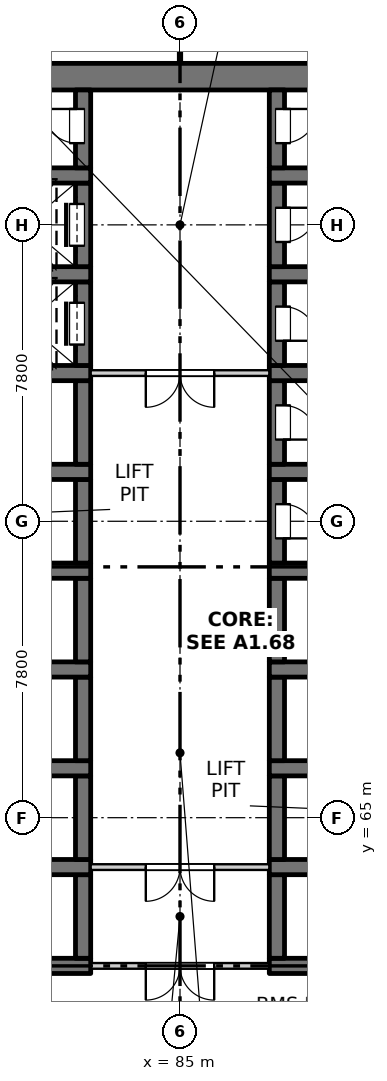
"""IFC4 building model, lengths in metres.
Left out: names, types, materials, properties, quantities, classifications, styles, units other than length and angle.
Written with IfcOpenShell. Run it as: python <this file> out.ifc"""

import sys

from ifc_helpers import new_model, si_unit, direction, frame, frame_2d, origin, place, context, subcontext, project, spatial, rectangle, extrude, element, fill, save


model = new_model("IFC4")
c1 = context("Model", 3, precision=1e-05, world=origin(), true_north=direction((0.0, 1.0)))
c2 = subcontext(c1, "Body", "Model", "MODEL_VIEW")
j1 = project(units=[si_unit("LENGTHUNIT", "METRE"), si_unit("PLANEANGLEUNIT", "RADIAN")], contexts=[c1])
p1 = place(None, origin())
s1 = spatial("IfcSite", under=j1, at=p1, CompositionType="ELEMENT")
p2 = place(p1, origin())
s2 = spatial("IfcBuilding", under=s1, at=p2, CompositionType="ELEMENT")
p3 = place(p2, frame((0.0, 0.0, -4.5)))
s3 = spatial("IfcBuildingStorey", under=s2, at=p3, CompositionType="ELEMENT", Elevation=-4.5)
p4 = place(p3, frame((75.6, 84.5, -0.35), z_axis=(0.0, 0.0, 1.0), x_axis=(1.0, 0.0, 0.0)))
e1 = element("IfcWall", 1, at=p4, inside=s3, PredefinedType="SOLIDWALL", context=c2, shape_type="SweptSolid", body=[
    extrude(rectangle(XDim=18.8, YDim=0.7, at=frame_2d((9.4, 0.0))), origin(), (0.0, 0.0, 1.0), 4.45),
])
p5 = place(p3, frame((79.65, 61.1, -0.35), z_axis=(0.0, 0.0, 1.0), x_axis=(1.0, 0.0, 0.0)))
e2 = element("IfcWall", 2, at=p5, inside=s3, PredefinedType="SOLIDWALL", context=c2, shape_type="SweptSolid", body=[
    extrude(rectangle(XDim=3.0, YDim=0.4, at=frame_2d((1.5, 0.0))), origin(), (0.0, 0.0, 1.0), 4.45),
])
p6 = place(p3, frame((82.45, 61.3, -0.35), z_axis=(0.0, 0.0, 1.0), x_axis=(0.0, 1.0, 0.0)))
e3 = element("IfcWall", 3, at=p6, inside=s3, PredefinedType="SOLIDWALL", context=c2, shape_type="SweptSolid", body=[
    extrude(rectangle(XDim=2.2, YDim=0.4, at=frame_2d((1.1, 0.0))), origin(), (0.0, 0.0, 1.0), 4.45),
])
p7 = place(p3, frame((79.65, 63.7, -0.35), z_axis=(0.0, 0.0, 1.0), x_axis=(1.0, 0.0, 0.0)))
e4 = element("IfcWall", 4, at=p7, inside=s3, PredefinedType="SOLIDWALL", context=c2, shape_type="SweptSolid", body=[
    extrude(rectangle(XDim=3.0, YDim=0.4, at=frame_2d((1.5, 0.0))), origin(), (0.0, 0.0, 1.0), 4.45),
])
p8 = place(p3, frame((82.45, 63.9, -0.35), z_axis=(0.0, 0.0, 1.0), x_axis=(0.0, 1.0, 0.0)))
e5 = element("IfcWall", 5, at=p8, inside=s3, PredefinedType="SOLIDWALL", context=c2, shape_type="SweptSolid", body=[
    extrude(rectangle(XDim=2.2, YDim=0.4, at=frame_2d((1.1, 0.0))), origin(), (0.0, 0.0, 1.0), 4.45),
])
p9 = place(p3, frame((79.65, 66.3, -0.35), z_axis=(0.0, 0.0, 1.0), x_axis=(1.0, 0.0, 0.0)))
e6 = element("IfcWall", 6, at=p9, inside=s3, PredefinedType="SOLIDWALL", context=c2, shape_type="SweptSolid", body=[
    extrude(rectangle(XDim=3.0, YDim=0.4, at=frame_2d((1.5, 0.0))), origin(), (0.0, 0.0, 1.0), 4.45),
])
p10 = place(p3, frame((82.45, 66.5, -0.35), z_axis=(0.0, 0.0, 1.0), x_axis=(0.0, 1.0, 0.0)))
e7 = element("IfcWall", 7, at=p10, inside=s3, PredefinedType="SOLIDWALL", context=c2, shape_type="SweptSolid", body=[
    extrude(rectangle(XDim=2.2, YDim=0.4, at=frame_2d((1.1, 0.0))), origin(), (0.0, 0.0, 1.0), 4.45),
])
p11 = place(p3, frame((79.65, 68.9, -0.35), z_axis=(0.0, 0.0, 1.0), x_axis=(1.0, 0.0, 0.0)))
e8 = element("IfcWall", 8, at=p11, inside=s3, PredefinedType="SOLIDWALL", context=c2, shape_type="SweptSolid", body=[
    extrude(rectangle(XDim=3.0, YDim=0.4, at=frame_2d((1.5, 0.0))), origin(), (0.0, 0.0, 1.0), 4.45),
])
p12 = place(p3, frame((82.45, 69.1, -0.35), z_axis=(0.0, 0.0, 1.0), x_axis=(0.0, 1.0, 0.0)))
e9 = element("IfcWall", 9, at=p12, inside=s3, PredefinedType="SOLIDWALL", context=c2, shape_type="SweptSolid", body=[
    extrude(rectangle(XDim=2.2, YDim=0.4, at=frame_2d((1.1, 0.0))), origin(), (0.0, 0.0, 1.0), 4.45),
])
p13 = place(p3, frame((79.65, 71.5, -0.35), z_axis=(0.0, 0.0, 1.0), x_axis=(1.0, 0.0, 0.0)))
e10 = element("IfcWall", 10, at=p13, inside=s3, PredefinedType="SOLIDWALL", context=c2, shape_type="SweptSolid", body=[
    extrude(rectangle(XDim=3.0, YDim=0.4, at=frame_2d((1.5, 0.0))), origin(), (0.0, 0.0, 1.0), 4.45),
])
p14 = place(p3, frame((82.45, 71.7, -0.35), z_axis=(0.0, 0.0, 1.0), x_axis=(0.0, 1.0, 0.0)))
e11 = element("IfcWall", 11, at=p14, inside=s3, PredefinedType="SOLIDWALL", context=c2, shape_type="SweptSolid", body=[
    extrude(rectangle(XDim=2.2, YDim=0.4, at=frame_2d((1.1, 0.0))), origin(), (0.0, 0.0, 1.0), 4.45),
])
p15 = place(p3, frame((79.65, 74.1, -0.35), z_axis=(0.0, 0.0, 1.0), x_axis=(1.0, 0.0, 0.0)))
e12 = element("IfcWall", 12, at=p15, inside=s3, PredefinedType="SOLIDWALL", context=c2, shape_type="SweptSolid", body=[
    extrude(rectangle(XDim=3.0, YDim=0.4, at=frame_2d((1.5, 0.0))), origin(), (0.0, 0.0, 1.0), 4.45),
])
p16 = place(p3, frame((82.45, 74.3, -0.35), z_axis=(0.0, 0.0, 1.0), x_axis=(0.0, 1.0, 0.0)))
e13 = element("IfcWall", 13, at=p16, inside=s3, PredefinedType="SOLIDWALL", context=c2, shape_type="SweptSolid", body=[
    extrude(rectangle(XDim=2.2, YDim=0.4, at=frame_2d((1.1, 0.0))), origin(), (0.0, 0.0, 1.0), 4.45),
])
p17 = place(p3, frame((79.65, 76.7, -0.35), z_axis=(0.0, 0.0, 1.0), x_axis=(1.0, 0.0, 0.0)))
e14 = element("IfcWall", 14, at=p17, inside=s3, PredefinedType="SOLIDWALL", context=c2, shape_type="SweptSolid", body=[
    extrude(rectangle(XDim=3.0, YDim=0.4, at=frame_2d((1.5, 0.0))), origin(), (0.0, 0.0, 1.0), 4.45),
])
p18 = place(p3, frame((82.45, 76.9, -0.35), z_axis=(0.0, 0.0, 1.0), x_axis=(0.0, 1.0, 0.0)))
e15 = element("IfcWall", 15, at=p18, inside=s3, PredefinedType="SOLIDWALL", context=c2, shape_type="SweptSolid", body=[
    extrude(rectangle(XDim=2.2, YDim=0.4, at=frame_2d((1.1, 0.0))), origin(), (0.0, 0.0, 1.0), 4.45),
])
p19 = place(p18, frame((0.55, 0.0, 0.35)))
e16 = element("IfcOpeningElement", 16, at=p19, cuts=e15, PredefinedType="OPENING", context=c2, shape_type="SweptSolid", body=[
    extrude(rectangle(XDim=1.1, YDim=2.1, at=frame_2d((0.55, 1.05))), frame((0.0, 0.21, 0.0), z_axis=(0.0, -1.0, 0.0), x_axis=(1.0, 0.0, 0.0)), (0.0, 0.0, 1.0), 0.42),
])
p20 = place(p3, frame((79.65, 79.3, -0.35), z_axis=(0.0, 0.0, 1.0), x_axis=(1.0, 0.0, 0.0)))
e17 = element("IfcWall", 17, at=p20, inside=s3, PredefinedType="SOLIDWALL", context=c2, shape_type="SweptSolid", body=[
    extrude(rectangle(XDim=3.0, YDim=0.4, at=frame_2d((1.5, 0.0))), origin(), (0.0, 0.0, 1.0), 4.45),
])
p21 = place(p3, frame((82.45, 79.5, -0.35), z_axis=(0.0, 0.0, 1.0), x_axis=(0.0, 1.0, 0.0)))
e18 = element("IfcWall", 18, at=p21, inside=s3, PredefinedType="SOLIDWALL", context=c2, shape_type="SweptSolid", body=[
    extrude(rectangle(XDim=2.2, YDim=0.4, at=frame_2d((1.1, 0.0))), origin(), (0.0, 0.0, 1.0), 4.45),
])
p22 = place(p21, frame((0.55, 0.0, 0.35)))
e19 = element("IfcOpeningElement", 19, at=p22, cuts=e18, PredefinedType="OPENING", context=c2, shape_type="SweptSolid", body=[
    extrude(rectangle(XDim=1.1, YDim=2.1, at=frame_2d((0.55, 1.05))), frame((0.0, 0.21, 0.0), z_axis=(0.0, -1.0, 0.0), x_axis=(1.0, 0.0, 0.0)), (0.0, 0.0, 1.0), 0.42),
])
p23 = place(p3, frame((79.65, 81.9, -0.35), z_axis=(0.0, 0.0, 1.0), x_axis=(1.0, 0.0, 0.0)))
e20 = element("IfcWall", 20, at=p23, inside=s3, PredefinedType="SOLIDWALL", context=c2, shape_type="SweptSolid", body=[
    extrude(rectangle(XDim=3.0, YDim=0.4, at=frame_2d((1.5, 0.0))), origin(), (0.0, 0.0, 1.0), 4.45),
])
p24 = place(p3, frame((82.45, 82.1, -0.35), z_axis=(0.0, 0.0, 1.0), x_axis=(0.0, 1.0, 0.0)))
e21 = element("IfcWall", 21, at=p24, inside=s3, PredefinedType="SOLIDWALL", context=c2, shape_type="SweptSolid", body=[
    extrude(rectangle(XDim=2.05, YDim=0.4, at=frame_2d((1.025, 0.0))), origin(), (0.0, 0.0, 1.0), 4.45),
])
p25 = place(p24, frame((0.65, 0.0, 0.35)))
e22 = element("IfcOpeningElement", 22, at=p25, cuts=e21, PredefinedType="OPENING", context=c2, shape_type="SweptSolid", body=[
    extrude(rectangle(XDim=0.9, YDim=2.1, at=frame_2d((0.45, 1.05))), frame((0.0, 0.21, 0.0), z_axis=(0.0, -1.0, 0.0), x_axis=(1.0, 0.0, 0.0)), (0.0, 0.0, 1.0), 0.42),
])
p26 = place(p3, frame((87.35, 61.1, -0.35), z_axis=(0.0, 0.0, 1.0), x_axis=(1.0, 0.0, 0.0)))
e23 = element("IfcWall", 23, at=p26, inside=s3, PredefinedType="SOLIDWALL", context=c2, shape_type="SweptSolid", body=[
    extrude(rectangle(XDim=3.0, YDim=0.4, at=frame_2d((1.5, 0.0))), origin(), (0.0, 0.0, 1.0), 4.45),
])
p27 = place(p3, frame((87.55, 61.3, -0.35), z_axis=(0.0, 0.0, 1.0), x_axis=(0.0, 1.0, 0.0)))
e24 = element("IfcWall", 24, at=p27, inside=s3, PredefinedType="SOLIDWALL", context=c2, shape_type="SweptSolid", body=[
    extrude(rectangle(XDim=2.2, YDim=0.4, at=frame_2d((1.1, 0.0))), origin(), (0.0, 0.0, 1.0), 4.45),
])
p28 = place(p3, frame((87.35, 63.7, -0.35), z_axis=(0.0, 0.0, 1.0), x_axis=(1.0, 0.0, 0.0)))
e25 = element("IfcWall", 25, at=p28, inside=s3, PredefinedType="SOLIDWALL", context=c2, shape_type="SweptSolid", body=[
    extrude(rectangle(XDim=3.0, YDim=0.4, at=frame_2d((1.5, 0.0))), origin(), (0.0, 0.0, 1.0), 4.45),
])
p29 = place(p3, frame((87.55, 63.9, -0.35), z_axis=(0.0, 0.0, 1.0), x_axis=(0.0, 1.0, 0.0)))
e26 = element("IfcWall", 26, at=p29, inside=s3, PredefinedType="SOLIDWALL", context=c2, shape_type="SweptSolid", body=[
    extrude(rectangle(XDim=2.2, YDim=0.4, at=frame_2d((1.1, 0.0))), origin(), (0.0, 0.0, 1.0), 4.45),
])
p30 = place(p3, frame((87.35, 66.3, -0.35), z_axis=(0.0, 0.0, 1.0), x_axis=(1.0, 0.0, 0.0)))
e27 = element("IfcWall", 27, at=p30, inside=s3, PredefinedType="SOLIDWALL", context=c2, shape_type="SweptSolid", body=[
    extrude(rectangle(XDim=3.0, YDim=0.4, at=frame_2d((1.5, 0.0))), origin(), (0.0, 0.0, 1.0), 4.45),
])
p31 = place(p3, frame((87.55, 66.5, -0.35), z_axis=(0.0, 0.0, 1.0), x_axis=(0.0, 1.0, 0.0)))
e28 = element("IfcWall", 28, at=p31, inside=s3, PredefinedType="SOLIDWALL", context=c2, shape_type="SweptSolid", body=[
    extrude(rectangle(XDim=2.2, YDim=0.4, at=frame_2d((1.1, 0.0))), origin(), (0.0, 0.0, 1.0), 4.45),
])
p32 = place(p3, frame((87.35, 68.9, -0.35), z_axis=(0.0, 0.0, 1.0), x_axis=(1.0, 0.0, 0.0)))
e29 = element("IfcWall", 29, at=p32, inside=s3, PredefinedType="SOLIDWALL", context=c2, shape_type="SweptSolid", body=[
    extrude(rectangle(XDim=3.0, YDim=0.4, at=frame_2d((1.5, 0.0))), origin(), (0.0, 0.0, 1.0), 4.45),
])
p33 = place(p3, frame((87.55, 69.1, -0.35), z_axis=(0.0, 0.0, 1.0), x_axis=(0.0, 1.0, 0.0)))
e30 = element("IfcWall", 30, at=p33, inside=s3, PredefinedType="SOLIDWALL", context=c2, shape_type="SweptSolid", body=[
    extrude(rectangle(XDim=2.2, YDim=0.4, at=frame_2d((1.1, 0.0))), origin(), (0.0, 0.0, 1.0), 4.45),
])
p34 = place(p3, frame((87.35, 71.5, -0.35), z_axis=(0.0, 0.0, 1.0), x_axis=(1.0, 0.0, 0.0)))
e31 = element("IfcWall", 31, at=p34, inside=s3, PredefinedType="SOLIDWALL", context=c2, shape_type="SweptSolid", body=[
    extrude(rectangle(XDim=3.0, YDim=0.4, at=frame_2d((1.5, 0.0))), origin(), (0.0, 0.0, 1.0), 4.45),
])
p35 = place(p3, frame((87.55, 71.7, -0.35), z_axis=(0.0, 0.0, 1.0), x_axis=(0.0, 1.0, 0.0)))
e32 = element("IfcWall", 32, at=p35, inside=s3, PredefinedType="SOLIDWALL", context=c2, shape_type="SweptSolid", body=[
    extrude(rectangle(XDim=2.2, YDim=0.4, at=frame_2d((1.1, 0.0))), origin(), (0.0, 0.0, 1.0), 4.45),
])
p36 = place(p35, frame((0.65, 0.0, 0.35)))
e33 = element("IfcOpeningElement", 33, at=p36, cuts=e32, PredefinedType="OPENING", context=c2, shape_type="SweptSolid", body=[
    extrude(rectangle(XDim=0.9, YDim=2.1, at=frame_2d((0.45, 1.05))), frame((0.0, 0.21, 0.0), z_axis=(0.0, -1.0, 0.0), x_axis=(1.0, 0.0, 0.0)), (0.0, 0.0, 1.0), 0.42),
])
p37 = place(p3, frame((87.35, 74.1, -0.35), z_axis=(0.0, 0.0, 1.0), x_axis=(1.0, 0.0, 0.0)))
e34 = element("IfcWall", 34, at=p37, inside=s3, PredefinedType="SOLIDWALL", context=c2, shape_type="SweptSolid", body=[
    extrude(rectangle(XDim=3.0, YDim=0.4, at=frame_2d((1.5, 0.0))), origin(), (0.0, 0.0, 1.0), 4.45),
])
p38 = place(p3, frame((87.55, 74.3, -0.35), z_axis=(0.0, 0.0, 1.0), x_axis=(0.0, 1.0, 0.0)))
e35 = element("IfcWall", 35, at=p38, inside=s3, PredefinedType="SOLIDWALL", context=c2, shape_type="SweptSolid", body=[
    extrude(rectangle(XDim=2.2, YDim=0.4, at=frame_2d((1.1, 0.0))), origin(), (0.0, 0.0, 1.0), 4.45),
])
p39 = place(p38, frame((0.65, 0.0, 0.35)))
e36 = element("IfcOpeningElement", 36, at=p39, cuts=e35, PredefinedType="OPENING", context=c2, shape_type="SweptSolid", body=[
    extrude(rectangle(XDim=0.9, YDim=2.1, at=frame_2d((0.45, 1.05))), frame((0.0, 0.21, 0.0), z_axis=(0.0, -1.0, 0.0), x_axis=(1.0, 0.0, 0.0)), (0.0, 0.0, 1.0), 0.42),
])
p40 = place(p3, frame((87.35, 76.7, -0.35), z_axis=(0.0, 0.0, 1.0), x_axis=(1.0, 0.0, 0.0)))
e37 = element("IfcWall", 37, at=p40, inside=s3, PredefinedType="SOLIDWALL", context=c2, shape_type="SweptSolid", body=[
    extrude(rectangle(XDim=3.0, YDim=0.4, at=frame_2d((1.5, 0.0))), origin(), (0.0, 0.0, 1.0), 4.45),
])
p41 = place(p3, frame((87.55, 76.9, -0.35), z_axis=(0.0, 0.0, 1.0), x_axis=(0.0, 1.0, 0.0)))
e38 = element("IfcWall", 38, at=p41, inside=s3, PredefinedType="SOLIDWALL", context=c2, shape_type="SweptSolid", body=[
    extrude(rectangle(XDim=2.2, YDim=0.4, at=frame_2d((1.1, 0.0))), origin(), (0.0, 0.0, 1.0), 4.45),
])
p42 = place(p41, frame((0.65, 0.0, 0.35)))
e39 = element("IfcOpeningElement", 39, at=p42, cuts=e38, PredefinedType="OPENING", context=c2, shape_type="SweptSolid", body=[
    extrude(rectangle(XDim=0.9, YDim=2.1, at=frame_2d((0.45, 1.05))), frame((0.0, 0.21, 0.0), z_axis=(0.0, -1.0, 0.0), x_axis=(1.0, 0.0, 0.0)), (0.0, 0.0, 1.0), 0.42),
])
p43 = place(p3, frame((87.35, 79.3, -0.35), z_axis=(0.0, 0.0, 1.0), x_axis=(1.0, 0.0, 0.0)))
e40 = element("IfcWall", 40, at=p43, inside=s3, PredefinedType="SOLIDWALL", context=c2, shape_type="SweptSolid", body=[
    extrude(rectangle(XDim=3.0, YDim=0.4, at=frame_2d((1.5, 0.0))), origin(), (0.0, 0.0, 1.0), 4.45),
])
p44 = place(p3, frame((87.55, 79.5, -0.35), z_axis=(0.0, 0.0, 1.0), x_axis=(0.0, 1.0, 0.0)))
e41 = element("IfcWall", 41, at=p44, inside=s3, PredefinedType="SOLIDWALL", context=c2, shape_type="SweptSolid", body=[
    extrude(rectangle(XDim=2.2, YDim=0.4, at=frame_2d((1.1, 0.0))), origin(), (0.0, 0.0, 1.0), 4.45),
])
p45 = place(p44, frame((0.65, 0.0, 0.35)))
e42 = element("IfcOpeningElement", 42, at=p45, cuts=e41, PredefinedType="OPENING", context=c2, shape_type="SweptSolid", body=[
    extrude(rectangle(XDim=0.9, YDim=2.1, at=frame_2d((0.45, 1.05))), frame((0.0, 0.21, 0.0), z_axis=(0.0, -1.0, 0.0), x_axis=(1.0, 0.0, 0.0)), (0.0, 0.0, 1.0), 0.42),
])
p46 = place(p3, frame((87.35, 81.9, -0.35), z_axis=(0.0, 0.0, 1.0), x_axis=(1.0, 0.0, 0.0)))
e43 = element("IfcWall", 43, at=p46, inside=s3, PredefinedType="SOLIDWALL", context=c2, shape_type="SweptSolid", body=[
    extrude(rectangle(XDim=3.0, YDim=0.4, at=frame_2d((1.5, 0.0))), origin(), (0.0, 0.0, 1.0), 4.45),
])
p47 = place(p3, frame((87.55, 82.1, -0.35), z_axis=(0.0, 0.0, 1.0), x_axis=(0.0, 1.0, 0.0)))
e44 = element("IfcWall", 44, at=p47, inside=s3, PredefinedType="SOLIDWALL", context=c2, shape_type="SweptSolid", body=[
    extrude(rectangle(XDim=2.05, YDim=0.4, at=frame_2d((1.025, 0.0))), origin(), (0.0, 0.0, 1.0), 4.45),
])
p48 = place(p47, frame((0.65, 0.0, 0.35)))
e45 = element("IfcOpeningElement", 45, at=p48, cuts=e44, PredefinedType="OPENING", context=c2, shape_type="SweptSolid", body=[
    extrude(rectangle(XDim=0.9, YDim=2.1, at=frame_2d((0.45, 1.05))), frame((0.0, 0.21, 0.0), z_axis=(0.0, -1.0, 0.0), x_axis=(1.0, 0.0, 0.0)), (0.0, 0.0, 1.0), 0.42),
])
p49 = place(p3, frame((82.65, 61.1, 0.0), z_axis=(0.0, 0.0, 1.0), x_axis=(1.0, 0.0, 0.0)))
e46 = element("IfcWall", 46, at=p49, inside=s3, PredefinedType="PARTITIONING", context=c2, shape_type="SweptSolid", body=[
    extrude(rectangle(XDim=4.7, YDim=0.15, at=frame_2d((2.35, 0.0))), origin(), (0.0, 0.0, 1.0), 4.1),
])
p50 = place(p49, frame((1.45, 0.0, 0.0)))
e47 = element("IfcOpeningElement", 47, at=p50, cuts=e46, PredefinedType="OPENING", context=c2, shape_type="SweptSolid", body=[
    extrude(rectangle(XDim=1.8, YDim=2.1, at=frame_2d((0.9, 1.05))), frame((0.0, 0.085, 0.0), z_axis=(0.0, -1.0, 0.0), x_axis=(1.0, 0.0, 0.0)), (0.0, 0.0, 1.0), 0.17),
])
p51 = place(p3, frame((82.65, 63.7, 0.0), z_axis=(0.0, 0.0, 1.0), x_axis=(1.0, 0.0, 0.0)))
e48 = element("IfcWall", 48, at=p51, inside=s3, PredefinedType="PARTITIONING", context=c2, shape_type="SweptSolid", body=[
    extrude(rectangle(XDim=4.7, YDim=0.15, at=frame_2d((2.35, 0.0))), origin(), (0.0, 0.0, 1.0), 4.1),
])
p52 = place(p51, frame((1.45, 0.0, 0.0)))
e49 = element("IfcOpeningElement", 49, at=p52, cuts=e48, PredefinedType="OPENING", context=c2, shape_type="SweptSolid", body=[
    extrude(rectangle(XDim=1.8, YDim=2.1, at=frame_2d((0.9, 1.05))), frame((0.0, 0.085, 0.0), z_axis=(0.0, -1.0, 0.0), x_axis=(1.0, 0.0, 0.0)), (0.0, 0.0, 1.0), 0.17),
])
p53 = place(p3, frame((82.65, 76.7, 0.0), z_axis=(0.0, 0.0, 1.0), x_axis=(1.0, 0.0, 0.0)))
e50 = element("IfcWall", 50, at=p53, inside=s3, PredefinedType="PARTITIONING", context=c2, shape_type="SweptSolid", body=[
    extrude(rectangle(XDim=4.7, YDim=0.15, at=frame_2d((2.35, 0.0))), origin(), (0.0, 0.0, 1.0), 4.1),
])
p54 = place(p53, frame((1.45, 0.0, 0.0)))
e51 = element("IfcOpeningElement", 51, at=p54, cuts=e50, PredefinedType="OPENING", context=c2, shape_type="SweptSolid", body=[
    extrude(rectangle(XDim=1.8, YDim=2.1, at=frame_2d((0.9, 1.05))), frame((0.0, 0.085, 0.0), z_axis=(0.0, -1.0, 0.0), x_axis=(1.0, 0.0, 0.0)), (0.0, 0.0, 1.0), 0.17),
])
p55 = place(p3, frame((85.0, 84.85, 0.0), z_axis=(0.0, 0.0, 1.0), x_axis=(0.0, 1.0, 0.0)))
e52 = element("IfcWall", 52, at=p55, inside=s3, PredefinedType="PARTITIONING", context=c2, shape_type="SweptSolid", body=[
    extrude(rectangle(XDim=7.15, YDim=0.1, at=frame_2d((3.575, 0.0))), origin(), (0.0, 0.0, 1.0), 4.1),
])
p56 = place(p50, origin())
e53 = element("IfcDoor", 53, at=p56, inside=s3, OperationType="DOUBLE_DOOR_SINGLE_SWING", PredefinedType="DOOR", context=c2, shape_type="SweptSolid", body=[
    extrude(rectangle(XDim=1.8, YDim=2.1, at=frame_2d((0.9, 1.05))), frame((0.0, 0.025, 0.0), z_axis=(0.0, -1.0, 0.0), x_axis=(1.0, 0.0, 0.0)), (0.0, 0.0, 1.0), 0.05),
])
fill(e47, e53)
p57 = place(p52, origin())
e54 = element("IfcDoor", 54, at=p57, inside=s3, OperationType="DOUBLE_DOOR_SINGLE_SWING", PredefinedType="DOOR", context=c2, shape_type="SweptSolid", body=[
    extrude(rectangle(XDim=1.8, YDim=2.1, at=frame_2d((0.9, 1.05))), frame((0.0, 0.025, 0.0), z_axis=(0.0, -1.0, 0.0), x_axis=(1.0, 0.0, 0.0)), (0.0, 0.0, 1.0), 0.05),
])
fill(e49, e54)
p58 = place(p36, origin())
e55 = element("IfcDoor", 55, at=p58, inside=s3, OperationType="SINGLE_SWING_RIGHT", PredefinedType="DOOR", context=c2, shape_type="SweptSolid", body=[
    extrude(rectangle(XDim=0.9, YDim=2.1, at=frame_2d((0.45, 1.05))), frame((0.0, -0.135, 0.0), z_axis=(0.0, -1.0, 0.0), x_axis=(1.0, 0.0, 0.0)), (0.0, 0.0, 1.0), 0.05),
])
fill(e33, e55)
p59 = place(p39, origin())
e56 = element("IfcDoor", 56, at=p59, inside=s3, OperationType="SINGLE_SWING_RIGHT", PredefinedType="DOOR", context=c2, shape_type="SweptSolid", body=[
    extrude(rectangle(XDim=0.9, YDim=2.1, at=frame_2d((0.45, 1.05))), frame((0.0, -0.135, 0.0), z_axis=(0.0, -1.0, 0.0), x_axis=(1.0, 0.0, 0.0)), (0.0, 0.0, 1.0), 0.05),
])
fill(e36, e56)
p60 = place(p54, origin())
e57 = element("IfcDoor", 57, at=p60, inside=s3, OperationType="DOUBLE_DOOR_SINGLE_SWING", PredefinedType="DOOR", context=c2, shape_type="SweptSolid", body=[
    extrude(rectangle(XDim=1.8, YDim=2.1, at=frame_2d((0.9, 1.05))), frame((0.0, 0.025, 0.0), z_axis=(0.0, -1.0, 0.0), x_axis=(1.0, 0.0, 0.0)), (0.0, 0.0, 1.0), 0.05),
])
fill(e51, e57)
p61 = place(p19, origin())
e58 = element("IfcDoor", 58, at=p61, inside=s3, OperationType="SLIDING_TO_LEFT", PredefinedType="DOOR", context=c2, shape_type="SweptSolid", body=[
    extrude(rectangle(XDim=1.1, YDim=2.1, at=frame_2d((0.55, 1.05))), frame((0.0, 0.185, 0.0), z_axis=(0.0, -1.0, 0.0), x_axis=(1.0, 0.0, 0.0)), (0.0, 0.0, 1.0), 0.05),
])
fill(e16, e58)
p62 = place(p42, origin())
e59 = element("IfcDoor", 59, at=p62, inside=s3, OperationType="SINGLE_SWING_RIGHT", PredefinedType="DOOR", context=c2, shape_type="SweptSolid", body=[
    extrude(rectangle(XDim=0.9, YDim=2.1, at=frame_2d((0.45, 1.05))), frame((0.0, -0.135, 0.0), z_axis=(0.0, -1.0, 0.0), x_axis=(1.0, 0.0, 0.0)), (0.0, 0.0, 1.0), 0.05),
])
fill(e39, e59)
p63 = place(p22, origin())
e60 = element("IfcDoor", 60, at=p63, inside=s3, OperationType="SLIDING_TO_LEFT", PredefinedType="DOOR", context=c2, shape_type="SweptSolid", body=[
    extrude(rectangle(XDim=1.1, YDim=2.1, at=frame_2d((0.55, 1.05))), frame((0.0, 0.185, 0.0), z_axis=(0.0, -1.0, 0.0), x_axis=(1.0, 0.0, 0.0)), (0.0, 0.0, 1.0), 0.05),
])
fill(e19, e60)
p64 = place(p45, origin())
e61 = element("IfcDoor", 61, at=p64, inside=s3, OperationType="SINGLE_SWING_LEFT", PredefinedType="DOOR", context=c2, shape_type="SweptSolid", body=[
    extrude(rectangle(XDim=0.9, YDim=2.1, at=frame_2d((0.45, 1.05))), frame((0.0, -0.135, 0.0), z_axis=(0.0, -1.0, 0.0), x_axis=(1.0, 0.0, 0.0)), (0.0, 0.0, 1.0), 0.05),
])
fill(e42, e61)
p65 = place(p25, origin())
e62 = element("IfcDoor", 62, at=p65, inside=s3, OperationType="SINGLE_SWING_RIGHT", PredefinedType="DOOR", context=c2, shape_type="SweptSolid", body=[
    extrude(rectangle(XDim=0.9, YDim=2.1, at=frame_2d((0.45, 1.05))), frame((0.0, 0.185, 0.0), z_axis=(0.0, -1.0, 0.0), x_axis=(1.0, 0.0, 0.0)), (0.0, 0.0, 1.0), 0.05),
])
fill(e22, e62)
p66 = place(p48, origin())
e63 = element("IfcDoor", 63, at=p66, inside=s3, OperationType="SINGLE_SWING_LEFT", PredefinedType="DOOR", context=c2, shape_type="SweptSolid", body=[
    extrude(rectangle(XDim=0.9, YDim=2.1, at=frame_2d((0.45, 1.05))), frame((0.0, -0.135, 0.0), z_axis=(0.0, -1.0, 0.0), x_axis=(1.0, 0.0, 0.0)), (0.0, 0.0, 1.0), 0.05),
])
fill(e45, e63)
save(model, sys.argv[1])
